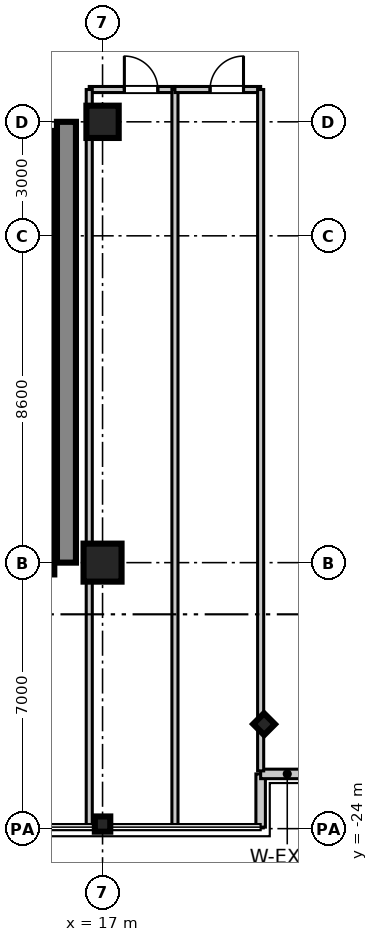
"""IFC4 building model, lengths in metres.
Left out: names, types, materials, properties, quantities, classifications, styles, units other than length and angle.
Written with IfcOpenShell. Run it as: python <this file> out.ifc"""

import sys

from ifc_helpers import new_model, si_unit, direction, frame, frame_2d, origin, origin_2d, place, context, subcontext, project, spatial, rectangle, i_section, extrude, source, transform, mapped, element, fill, save


model = new_model("IFC4")
c1 = context("Model", 3, precision=1e-05, world=origin(), true_north=direction((0.0, 1.0)))
c2 = subcontext(c1, "Body", "Model", "MODEL_VIEW")
j1 = project(units=[si_unit("LENGTHUNIT", "METRE"), si_unit("PLANEANGLEUNIT", "RADIAN")], contexts=[c1])
p1 = place(None, origin())
s1 = spatial("IfcSite", under=j1, at=p1, CompositionType="ELEMENT")
p2 = place(p1, origin())
s2 = spatial("IfcBuilding", under=s1, at=p2, CompositionType="ELEMENT")
p3 = place(p2, frame((0.0, 0.0, 241.9)))
s3 = spatial("IfcBuildingStorey", under=s2, at=p3, CompositionType="ELEMENT", Elevation=241.9)
m1 = source(origin(), c2, "Body", "SweptSolid", [
    extrude(rectangle(XDim=1.0, YDim=1.0, at=origin_2d()), origin(), (0.0, 0.0, 1.0), 3.655),
])
p4 = place(p3, frame((17.0, -17.0, 0.0), z_axis=(0.0, 0.0, 1.0), x_axis=(1.0, 0.0, 0.0)))
e1 = element("IfcColumn", 1, at=p4, inside=s3, PredefinedType="COLUMN", context=c2, shape_type="MappedRepresentation", body=[
    mapped(m1, transform((0.0, 0.0, 0.0), scale=1.0)),
])
m2 = source(origin(), c2, "Body", "SweptSolid", [
    extrude(rectangle(XDim=0.85, YDim=0.85, at=origin_2d()), origin(), (0.0, 0.0, 1.0), 3.655),
])
p5 = place(p3, frame((17.0, -5.4, 0.0), z_axis=(0.0, 0.0, 1.0), x_axis=(1.0, 0.0, 0.0)))
e2 = element("IfcColumn", 2, at=p5, inside=s3, PredefinedType="PILASTER", context=c2, shape_type="MappedRepresentation", body=[
    mapped(m2, transform((0.0, 0.0, 0.0), scale=1.0)),
])
m3 = source(origin(), c2, "Body", "SweptSolid", [
    extrude(i_section(OverallWidth=0.401, OverallDepth=0.406, WebThickness=0.016, FlangeThickness=0.025, at=origin_2d()), origin(), (0.0, 0.0, 1.0), 3.655),
])
for number, where, z_axis, x_axis in (
    (3, (17.0, -23.88, 0.0), (0.0, 0.0, 1.0), (0.0, 1.0, 0.0)),
    (4, (21.25, -21.25, 0.0), (0.0, 0.0, 1.0), (0.707, 0.707, 0.0)),
):
    element("IfcColumn", number, at=place(p3, frame(where, z_axis=z_axis, x_axis=x_axis)), inside=s3, PredefinedType="COLUMN", context=c2, shape_type="MappedRepresentation", body=[
        mapped(m3, transform((0.0, 0.0, 0.0), scale=1.0)),
    ])
m4 = source(origin(), c2, "Body", "SweptSolid", [
    extrude(rectangle(XDim=11.6, YDim=0.5, at=frame_2d((5.8, 0.0))), origin(), (0.0, 0.0, 1.0), 3.41),
])
p6 = place(p3, frame((16.05, -17.0, 0.0), z_axis=(0.0, 0.0, 1.0), x_axis=(0.0, 1.0, 0.0)))
e5 = element("IfcWall", 5, at=p6, inside=s3, PredefinedType="SHEAR", context=c2, shape_type="MappedRepresentation", body=[
    mapped(m4, transform((0.0, 0.0, 0.0), scale=1.0)),
])
m5 = source(origin(), c2, "Body", "SweptSolid", [
    extrude(rectangle(XDim=2.36, YDim=0.22, at=frame_2d((1.18, 0.0))), origin(), (0.0, 0.0, 1.0), 3.41),
])
p7 = place(p3, frame((15.62, -8.0, 0.0), z_axis=(0.0, 0.0, 1.0), x_axis=(0.0, 1.0, 0.0)))
e6 = element("IfcWall", 6, at=p7, inside=s3, PredefinedType="SHEAR", context=c2, shape_type="MappedRepresentation", body=[
    mapped(m5, transform((0.0, 0.0, 0.0), scale=1.0)),
])
m6 = source(origin(), c2, "Body", "SweptSolid", [
    extrude(rectangle(XDim=2.2, YDim=0.22, at=frame_2d((1.1, 0.0))), origin(), (0.0, 0.0, 1.0), 3.41),
])
for number, where, z_axis, x_axis in (
    (7, (15.62, -10.2, 0.0), (0.0, 0.0, 1.0), (0.0, 1.0, 0.0)),
    (8, (15.62, -12.4, 0.0), (0.0, 0.0, 1.0), (0.0, 1.0, 0.0)),
):
    element("IfcWall", number, at=place(p3, frame(where, z_axis=z_axis, x_axis=x_axis)), inside=s3, PredefinedType="SHEAR", context=c2, shape_type="MappedRepresentation", body=[
        mapped(m6, transform((0.0, 0.0, 0.0), scale=1.0)),
    ])
m7 = source(origin(), c2, "Body", "SweptSolid", [
    extrude(rectangle(XDim=2.3, YDim=0.22, at=frame_2d((1.15, 0.0))), origin(), (0.0, 0.0, 1.0), 3.41),
])
p8 = place(p3, frame((15.62, -14.7, 0.0), z_axis=(0.0, 0.0, 1.0), x_axis=(0.0, 1.0, 0.0)))
e9 = element("IfcWall", 9, at=p8, inside=s3, PredefinedType="SHEAR", context=c2, shape_type="MappedRepresentation", body=[
    mapped(m7, transform((0.0, 0.0, 0.0), scale=1.0)),
])
m8 = source(origin(), c2, "Body", "SweptSolid", [
    extrude(rectangle(XDim=2.61, YDim=0.22, at=frame_2d((1.305, 0.0))), origin(), (0.0, 0.0, 1.0), 3.41),
])
p9 = place(p3, frame((15.62, -17.31, 0.0), z_axis=(0.0, 0.0, 1.0), x_axis=(0.0, 1.0, 0.0)))
e10 = element("IfcWall", 10, at=p9, inside=s3, PredefinedType="SHEAR", context=c2, shape_type="MappedRepresentation", body=[
    mapped(m8, transform((0.0, 0.0, 0.0), scale=1.0)),
])
m9 = source(origin(), c2, "Body", "SweptSolid", [
    extrude(rectangle(XDim=1.4, YDim=0.25, at=frame_2d((0.7, 0.0))), origin(), (0.0, 0.0, 1.0), 3.41),
])
p10 = place(p3, frame((21.16, -23.96, 0.0), z_axis=(0.0, 0.0, 1.0), x_axis=(0.0, 1.0, 0.0)))
e11 = element("IfcWall", 11, at=p10, inside=s3, PredefinedType="STANDARD", context=c2, shape_type="MappedRepresentation", body=[
    mapped(m9, transform((0.0, 0.0, 0.0), scale=1.0)),
])
m10 = source(origin(), c2, "Body", "SweptSolid", [
    extrude(rectangle(XDim=1.4, YDim=0.25, at=frame_2d((0.7, 0.0))), origin(), (0.0, 0.0, 1.0), 3.41),
])
p11 = place(p3, frame((21.16, -22.56, 0.0), z_axis=(0.0, 0.0, 1.0), x_axis=(1.0, 0.0, 0.0)))
e12 = element("IfcWall", 12, at=p11, inside=s3, PredefinedType="STANDARD", context=c2, shape_type="MappedRepresentation", body=[
    mapped(m10, transform((0.0, 0.0, 0.0), scale=1.0)),
])
m11 = source(origin(), c2, "Body", "SweptSolid", [
    extrude(rectangle(XDim=2.255, YDim=0.16, at=frame_2d((1.127, 0.0))), origin(), (0.0, 0.0, 1.0), 2.75),
])
p12 = place(p3, frame((16.65, -4.55, 0.0), z_axis=(0.0, 0.0, 1.0), x_axis=(1.0, 0.0, 0.0)))
e13 = element("IfcWall", 13, at=p12, inside=s3, PredefinedType="PARTITIONING", context=c2, shape_type="MappedRepresentation", body=[
    mapped(m11, transform((0.0, 0.0, 0.0), scale=1.0)),
])
p13 = place(p12, frame((0.924, 0.0, 0.0)))
e14 = element("IfcOpeningElement", 14, at=p13, cuts=e13, PredefinedType="OPENING", context=c2, shape_type="SweptSolid", body=[
    extrude(rectangle(XDim=0.88, YDim=2.1, at=frame_2d((0.44, 1.05))), frame((0.0, 0.09, 0.0), z_axis=(0.0, -1.0, 0.0), x_axis=(1.0, 0.0, 0.0)), (0.0, 0.0, 1.0), 0.18),
])
m12 = source(origin(), c2, "Body", "SweptSolid", [
    extrude(rectangle(XDim=19.35, YDim=0.16, at=frame_2d((9.675, 0.0))), origin(), (0.0, 0.0, 1.0), 2.75),
])
for number, where, z_axis, x_axis in (
    (15, (16.65, -23.9, 0.0), (0.0, 0.0, 1.0), (0.0, 1.0, 0.0)),
    (16, (18.905, -23.9, 0.0), (0.0, 0.0, 1.0), (0.0, 1.0, 0.0)),
):
    element("IfcWall", number, at=place(p3, frame(where, z_axis=z_axis, x_axis=x_axis)), inside=s3, PredefinedType="PARTITIONING", context=c2, shape_type="MappedRepresentation", body=[
        mapped(m12, transform((0.0, 0.0, 0.0), scale=1.0)),
    ])
m13 = source(origin(), c2, "Body", "SweptSolid", [
    extrude(rectangle(XDim=2.255, YDim=0.16, at=frame_2d((1.127, 0.0))), origin(), (0.0, 0.0, 1.0), 2.75),
])
p14 = place(p3, frame((18.905, -4.55, 0.0), z_axis=(0.0, 0.0, 1.0), x_axis=(1.0, 0.0, 0.0)))
e17 = element("IfcWall", 17, at=p14, inside=s3, PredefinedType="PARTITIONING", context=c2, shape_type="MappedRepresentation", body=[
    mapped(m13, transform((0.0, 0.0, 0.0), scale=1.0)),
])
p15 = place(p14, frame((0.924, 0.0, 0.0)))
e18 = element("IfcOpeningElement", 18, at=p15, cuts=e17, PredefinedType="OPENING", context=c2, shape_type="SweptSolid", body=[
    extrude(rectangle(XDim=0.88, YDim=2.1, at=frame_2d((0.44, 1.05))), frame((0.0, 0.09, 0.0), z_axis=(0.0, -1.0, 0.0), x_axis=(1.0, 0.0, 0.0)), (0.0, 0.0, 1.0), 0.18),
])
m14 = source(origin(), c2, "Body", "SweptSolid", [
    extrude(rectangle(XDim=17.93, YDim=0.16, at=frame_2d((8.965, 0.0))), origin(), (0.0, 0.0, 1.0), 2.75),
])
p16 = place(p3, frame((21.16, -22.48, 0.0), z_axis=(0.0, 0.0, 1.0), x_axis=(0.0, 1.0, 0.0)))
e19 = element("IfcWall", 19, at=p16, inside=s3, PredefinedType="PARTITIONING", context=c2, shape_type="MappedRepresentation", body=[
    mapped(m14, transform((0.0, 0.0, 0.0), scale=1.0)),
])
m15 = source(origin(), c2, "Body", "SweptSolid", [
    extrude(rectangle(XDim=0.88, YDim=2.1, at=frame_2d((0.44, 1.05))), frame((0.0, 0.025, 0.0), z_axis=(0.0, -1.0, 0.0), x_axis=(1.0, 0.0, 0.0)), (0.0, 0.0, 1.0), 0.05),
])
p17 = place(p13, frame((0.88, 0.0, 0.0), z_axis=(0.0, 0.0, 1.0), x_axis=(-1.0, 0.0, 0.0)))
e20 = element("IfcDoor", 20, at=p17, inside=s3, OperationType="SINGLE_SWING_LEFT", PredefinedType="DOOR", context=c2, shape_type="MappedRepresentation", body=[
    mapped(m15, transform((0.0, 0.0, 0.0), scale=1.0)),
])
fill(e14, e20)
p18 = place(p15, frame((0.88, 0.0, 0.0), z_axis=(0.0, 0.0, 1.0), x_axis=(-1.0, 0.0, 0.0)))
e21 = element("IfcDoor", 21, at=p18, inside=s3, OperationType="SINGLE_SWING_RIGHT", PredefinedType="DOOR", context=c2, shape_type="MappedRepresentation", body=[
    mapped(m15, transform((0.0, 0.0, 0.0), scale=1.0)),
])
fill(e18, e21)
save(model, sys.argv[1])
